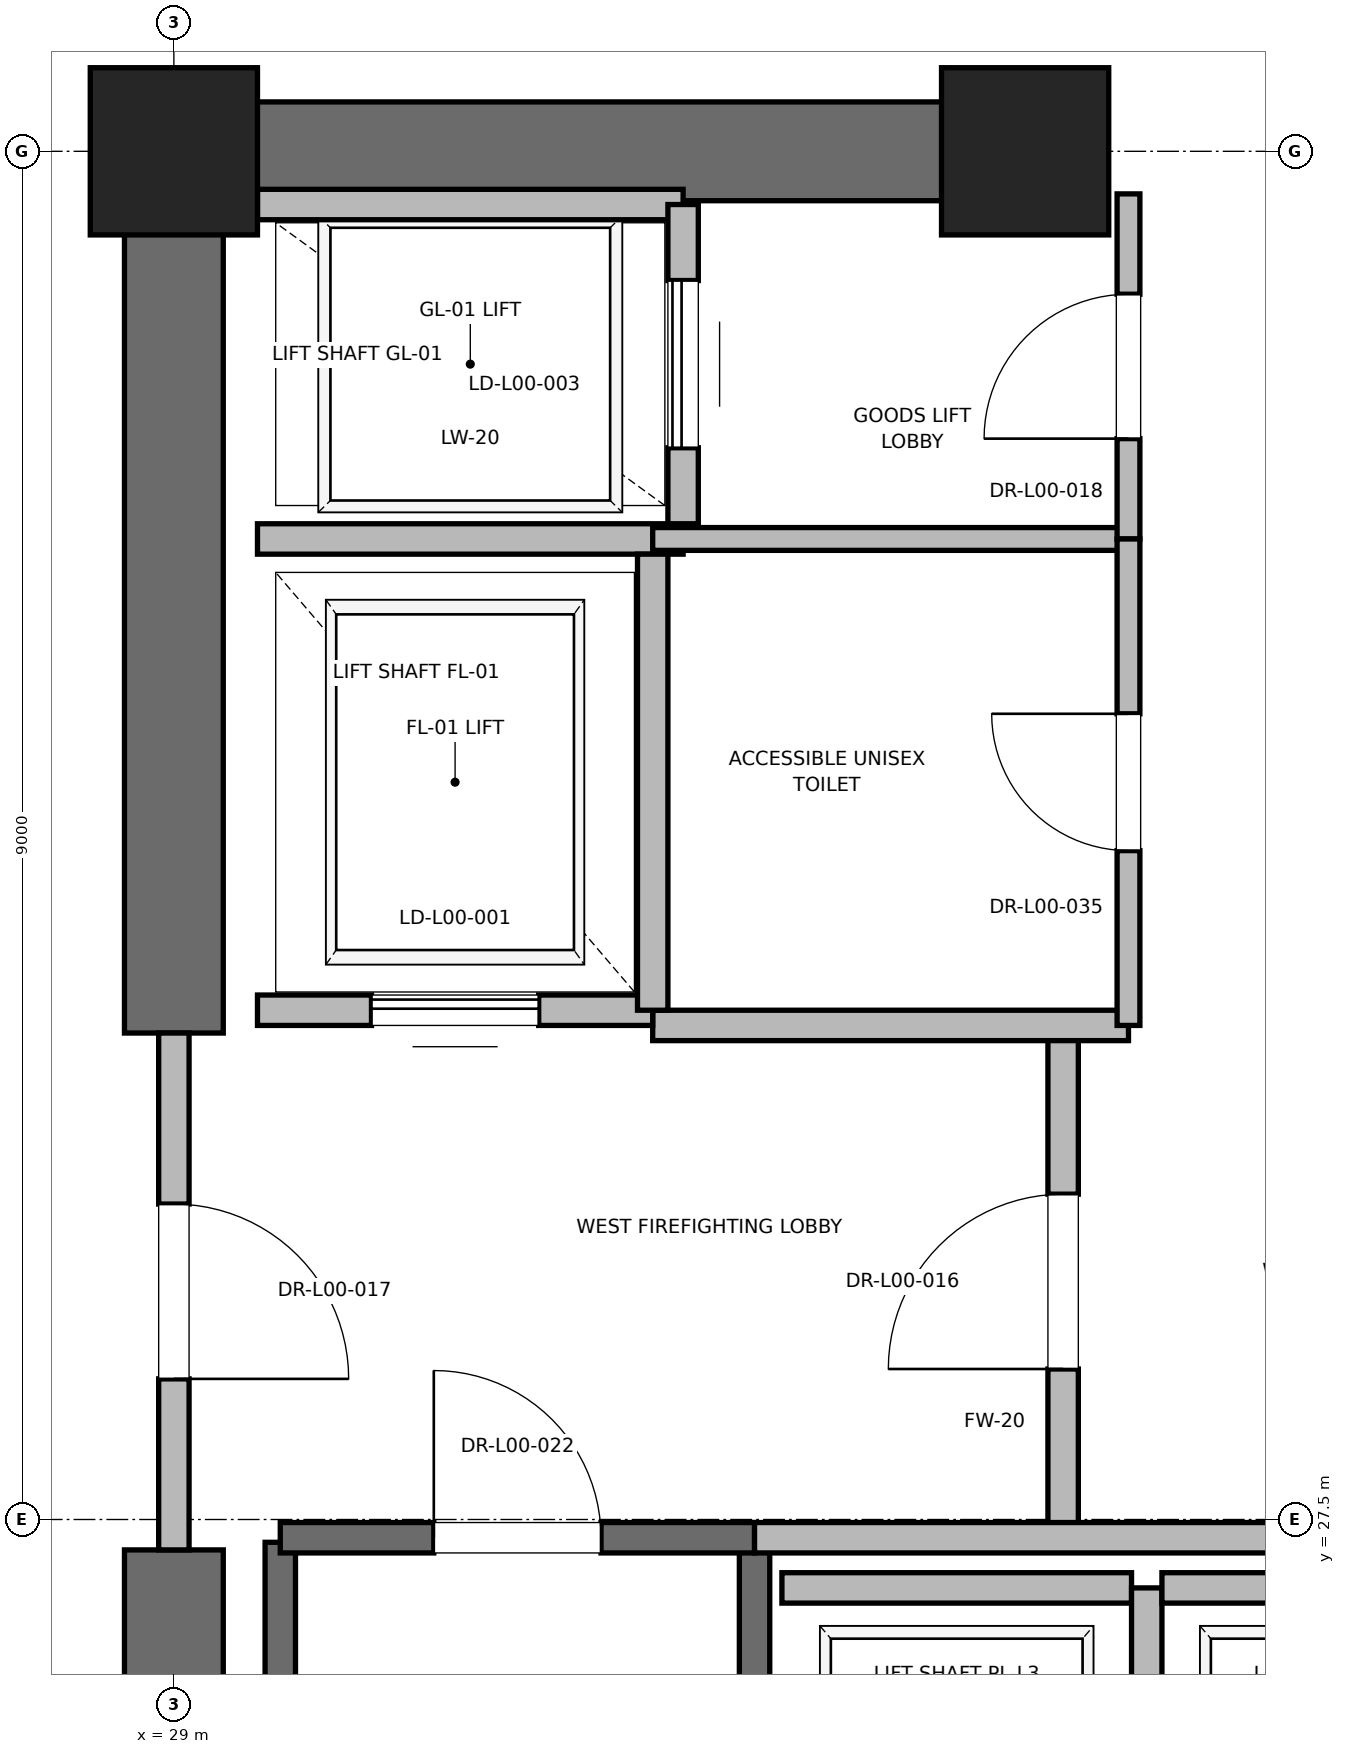
"""IFC4 building model, lengths in metres.
Left out: names, types, materials, properties, quantities, classifications, styles, units other than length and angle.
Written with IfcOpenShell. Run it as: python <this file> out.ifc"""

import sys

from ifc_helpers import new_model, si_unit, direction, frame, frame_2d, origin, origin_2d, place, context, subcontext, project, spatial, rectangle, extrude, element, fill, save


model = new_model("IFC4")
c1 = context("Model", 3, precision=1e-05, world=origin(), true_north=direction((0.0, 1.0)))
c2 = subcontext(c1, "Body", "Model", "MODEL_VIEW")
j1 = project(units=[si_unit("LENGTHUNIT", "METRE"), si_unit("PLANEANGLEUNIT", "RADIAN")], contexts=[c1])
p1 = place(None, origin())
s1 = spatial("IfcSite", under=j1, at=p1, CompositionType="ELEMENT")
p2 = place(p1, origin())
s2 = spatial("IfcBuilding", under=s1, at=p2, CompositionType="ELEMENT")
p3 = place(p2, origin())
s3 = spatial("IfcBuildingStorey", under=s2, at=p3, CompositionType="ELEMENT", Elevation=0.0)
for number, where, z_axis, x_axis in (
    (1, (29.0, 36.5, 0.0), (0.0, 0.0, 1.0), (1.0, 0.0, 0.0)),
    (2, (34.6, 36.5, 0.0), (0.0, 0.0, 1.0), (1.0, 0.0, 0.0)),
):
    element("IfcColumn", number, at=place(p3, frame(where, z_axis=z_axis, x_axis=x_axis)), inside=s3, PredefinedType="PILASTER", context=c2, shape_type="SweptSolid", body=[
        extrude(rectangle(XDim=1.1, YDim=1.1, at=origin_2d()), origin(), (0.0, 0.0, 1.0), 6.0),
    ])
p4 = place(p3, frame((29.0, 36.5, 0.0), z_axis=(0.0, 0.0, 1.0), x_axis=(1.0, 0.0, 0.0)))
e3 = element("IfcWall", 3, at=p4, inside=s3, PredefinedType="SHEAR", context=c2, shape_type="SweptSolid", body=[
    extrude(rectangle(XDim=5.8, YDim=0.65, at=frame_2d((2.9, 0.0))), origin(), (0.0, 0.0, 1.0), 5.72),
])
p5 = place(p3, frame((29.0, 18.5, 0.0), z_axis=(0.0, 0.0, 1.0), x_axis=(0.0, 1.0, 0.0)))
e4 = element("IfcWall", 4, at=p5, inside=s3, PredefinedType="SHEAR", context=c2, shape_type="SweptSolid", body=[
    extrude(rectangle(XDim=8.8, YDim=0.65, at=frame_2d((4.4, 0.0))), origin(), (0.0, 0.0, 1.0), 5.72),
])
p6 = place(p3, frame((29.0, 30.7, 0.0), z_axis=(0.0, 0.0, 1.0), x_axis=(0.0, 1.0, 0.0)))
e5 = element("IfcWall", 5, at=p6, inside=s3, PredefinedType="SHEAR", context=c2, shape_type="SweptSolid", body=[
    extrude(rectangle(XDim=5.8, YDim=0.65, at=frame_2d((2.9, 0.0))), origin(), (0.0, 0.0, 1.0), 5.72),
])
p7 = place(p3, frame((29.7, 19.2, 0.0), z_axis=(0.0, 0.0, 1.0), x_axis=(0.0, 1.0, 0.0)))
e6 = element("IfcWall", 6, at=p7, inside=s3, PredefinedType="SOLIDWALL", context=c2, shape_type="SweptSolid", body=[
    extrude(rectangle(XDim=8.15, YDim=0.2, at=frame_2d((4.075, 0.0))), origin(), (0.0, 0.0, 1.0), 5.72),
])
p8 = place(p3, frame((32.82, 18.6, 0.0), z_axis=(0.0, 0.0, 1.0), x_axis=(0.0, 1.0, 0.0)))
e7 = element("IfcWall", 7, at=p8, inside=s3, PredefinedType="SOLIDWALL", context=c2, shape_type="SweptSolid", body=[
    extrude(rectangle(XDim=8.78, YDim=0.2, at=frame_2d((4.39, 0.0))), origin(), (0.0, 0.0, 1.0), 5.72),
])
p9 = place(p3, frame((29.7, 27.38, 0.0), z_axis=(0.0, 0.0, 1.0), x_axis=(1.0, 0.0, 0.0)))
e8 = element("IfcWall", 8, at=p9, inside=s3, PredefinedType="SOLIDWALL", context=c2, shape_type="SweptSolid", body=[
    extrude(rectangle(XDim=3.12, YDim=0.2, at=frame_2d((1.56, 0.0))), origin(), (0.0, 0.0, 1.0), 5.72),
])
p10 = place(p9, frame((1.01, 0.0, 0.0)))
e9 = element("IfcOpeningElement", 9, at=p10, cuts=e8, PredefinedType="OPENING", context=c2, shape_type="SweptSolid", body=[
    extrude(rectangle(XDim=1.1, YDim=2.15, at=frame_2d((0.55, 1.075))), frame((0.0, 0.1, 0.0), z_axis=(0.0, -1.0, 0.0), x_axis=(1.0, 0.0, 0.0)), (0.0, 0.0, 1.0), 0.2),
])
p11 = place(p3, frame((34.85, 27.38, 0.0), z_axis=(0.0, 0.0, 1.0), x_axis=(0.0, 1.0, 0.0)))
e10 = element("IfcWall", 10, at=p11, inside=s3, PredefinedType="PARTITIONING", context=c2, shape_type="SweptSolid", body=[
    extrude(rectangle(XDim=3.37, YDim=0.2, at=frame_2d((1.685, 0.0))), origin(), (0.0, 0.0, 1.0), 5.72),
])
p12 = place(p11, frame((1.11, 0.0, 0.0)))
e11 = element("IfcOpeningElement", 11, at=p12, cuts=e10, PredefinedType="OPENING", context=c2, shape_type="SweptSolid", body=[
    extrude(rectangle(XDim=1.15, YDim=2.2, at=frame_2d((0.575, 1.1))), frame((0.0, 0.1, 0.0), z_axis=(0.0, -1.0, 0.0), x_axis=(1.0, 0.0, 0.0)), (0.0, 0.0, 1.0), 0.2),
])
p13 = place(p3, frame((29.0, 30.7, 0.0), z_axis=(0.0, 0.0, 1.0), x_axis=(0.0, -1.0, 0.0)))
e12 = element("IfcWall", 12, at=p13, inside=s3, PredefinedType="PARTITIONING", context=c2, shape_type="SweptSolid", body=[
    extrude(rectangle(XDim=3.4, YDim=0.2, at=frame_2d((1.7, 0.0))), origin(), (0.0, 0.0, 1.0), 4.5),
])
p14 = place(p13, frame((1.125, 0.0, 0.0)))
e13 = element("IfcOpeningElement", 13, at=p14, cuts=e12, PredefinedType="OPENING", context=c2, shape_type="SweptSolid", body=[
    extrude(rectangle(XDim=1.15, YDim=2.2, at=frame_2d((0.575, 1.1))), frame((0.0, 0.1, 0.0), z_axis=(0.0, -1.0, 0.0), x_axis=(1.0, 0.0, 0.0)), (0.0, 0.0, 1.0), 0.2),
])
p15 = place(p3, frame((32.82, 27.38, 0.0), z_axis=(0.0, 0.0, 1.0), x_axis=(1.0, 0.0, 0.0)))
e14 = element("IfcWall", 14, at=p15, inside=s3, PredefinedType="PARTITIONING", context=c2, shape_type="SweptSolid", body=[
    extrude(rectangle(XDim=5.62, YDim=0.2, at=frame_2d((2.81, 0.0))), origin(), (0.0, 0.0, 1.0), 5.72),
])
p16 = place(p3, frame((32.15, 30.75, 0.0), z_axis=(0.0, 0.0, 1.0), x_axis=(1.0, 0.0, 0.0)))
e15 = element("IfcWall", 15, at=p16, inside=s3, PredefinedType="PARTITIONING", context=c2, shape_type="SweptSolid", body=[
    extrude(rectangle(XDim=3.13, YDim=0.2, at=frame_2d((1.565, 0.0))), origin(), (0.0, 0.0, 1.0), 5.72),
])
p17 = place(p3, frame((29.55, 30.85, 0.0), z_axis=(0.0, 0.0, 1.0), x_axis=(1.0, 0.0, 0.0)))
e16 = element("IfcWall", 16, at=p17, inside=s3, PredefinedType="SOLIDWALL", context=c2, shape_type="SweptSolid", body=[
    extrude(rectangle(XDim=2.6, YDim=0.2, at=frame_2d((1.3, 0.0))), origin(), (0.0, 0.0, 1.0), 4.5),
])
p18 = place(p17, frame((0.75, 0.0, 0.0)))
e17 = element("IfcOpeningElement", 17, at=p18, cuts=e16, PredefinedType="OPENING", context=c2, shape_type="SweptSolid", body=[
    extrude(rectangle(XDim=1.1, YDim=2.2, at=frame_2d((0.55, 1.1))), frame((0.0, 0.1, 0.0), z_axis=(0.0, -1.0, 0.0), x_axis=(1.0, 0.0, 0.0)), (0.0, 0.0, 1.0), 0.2),
])
p19 = place(p3, frame((29.55, 33.95, 0.0), z_axis=(0.0, 0.0, 1.0), x_axis=(1.0, 0.0, 0.0)))
e18 = element("IfcWall", 18, at=p19, inside=s3, PredefinedType="SOLIDWALL", context=c2, shape_type="SweptSolid", body=[
    extrude(rectangle(XDim=2.8, YDim=0.2, at=frame_2d((1.4, 0.0))), origin(), (0.0, 0.0, 1.0), 5.72),
])
p20 = place(p3, frame((32.15, 30.85, 0.0), z_axis=(0.0, 0.0, 1.0), x_axis=(0.0, 1.0, 0.0)))
e19 = element("IfcWall", 19, at=p20, inside=s3, PredefinedType="SOLIDWALL", context=c2, shape_type="SweptSolid", body=[
    extrude(rectangle(XDim=3.0, YDim=0.2, at=frame_2d((1.5, 0.0))), origin(), (0.0, 0.0, 1.0), 5.72),
])
p21 = place(p3, frame((32.35, 36.15, 0.0), z_axis=(0.0, 0.0, 1.0), x_axis=(-1.0, 0.0, 0.0)))
e20 = element("IfcWall", 20, at=p21, inside=s3, PredefinedType="SOLIDWALL", context=c2, shape_type="SweptSolid", body=[
    extrude(rectangle(XDim=2.8, YDim=0.2, at=frame_2d((1.4, 0.0))), origin(), (0.0, 0.0, 1.0), 4.779),
])
p22 = place(p3, frame((32.35, 34.05, 0.0), z_axis=(0.0, 0.0, 1.0), x_axis=(0.0, 1.0, 0.0)))
e21 = element("IfcWall", 21, at=p22, inside=s3, PredefinedType="SOLIDWALL", context=c2, shape_type="SweptSolid", body=[
    extrude(rectangle(XDim=2.1, YDim=0.2, at=frame_2d((1.05, 0.0))), origin(), (0.0, 0.0, 1.0), 5.72),
])
p23 = place(p22, frame((0.5, 0.0, 0.0)))
e22 = element("IfcOpeningElement", 22, at=p23, cuts=e21, PredefinedType="OPENING", context=c2, shape_type="SweptSolid", body=[
    extrude(rectangle(XDim=1.1, YDim=2.2, at=frame_2d((0.55, 1.1))), frame((0.0, 0.1, 0.0), z_axis=(0.0, -1.0, 0.0), x_axis=(1.0, 0.0, 0.0)), (0.0, 0.0, 1.0), 0.2),
])
p24 = place(p3, frame((35.3, 27.05, 0.0), z_axis=(0.0, 0.0, 1.0), x_axis=(-1.0, 0.0, 0.0)))
e23 = element("IfcWall", 23, at=p24, inside=s3, PredefinedType="SOLIDWALL", context=c2, shape_type="SweptSolid", body=[
    extrude(rectangle(XDim=2.3, YDim=0.2, at=frame_2d((1.15, 0.0))), origin(), (0.0, 0.0, 1.0), 5.72),
])
p25 = place(p3, frame((35.4, 24.45, 0.0), z_axis=(0.0, 0.0, 1.0), x_axis=(0.0, 1.0, 0.0)))
e24 = element("IfcWall", 24, at=p25, inside=s3, PredefinedType="SOLIDWALL", context=c2, shape_type="SweptSolid", body=[
    extrude(rectangle(XDim=2.6, YDim=0.2, at=frame_2d((1.3, 0.0))), origin(), (0.0, 0.0, 1.0), 5.72),
])
p26 = place(p3, frame((37.8, 27.05, 0.0), z_axis=(0.0, 0.0, 1.0), x_axis=(-1.0, 0.0, 0.0)))
e25 = element("IfcWall", 25, at=p26, inside=s3, PredefinedType="SOLIDWALL", context=c2, shape_type="SweptSolid", body=[
    extrude(rectangle(XDim=2.3, YDim=0.2, at=frame_2d((1.15, 0.0))), origin(), (0.0, 0.0, 1.0), 5.72),
])
p27 = place(p3, frame((32.15, 33.95, 0.0), z_axis=(0.0, 0.0, 1.0), x_axis=(1.0, 0.0, 0.0)))
e26 = element("IfcWall", 26, at=p27, inside=s3, PredefinedType="PARTITIONING", context=c2, shape_type="SweptSolid", body=[
    extrude(rectangle(XDim=3.13, YDim=0.15, at=frame_2d((1.565, 0.0))), origin(), (0.0, 0.0, 1.0), 2.85),
])
p28 = place(p3, frame((35.28, 33.95, 0.0), z_axis=(0.0, 0.0, 1.0), x_axis=(0.0, 1.0, 0.0)))
e27 = element("IfcWall", 27, at=p28, inside=s3, PredefinedType="PARTITIONING", context=c2, shape_type="SweptSolid", body=[
    extrude(rectangle(XDim=2.27, YDim=0.15, at=frame_2d((1.135, 0.0))), origin(), (0.0, 0.0, 1.0), 2.85),
])
p29 = place(p28, frame((0.66, 0.0, 0.0)))
e28 = element("IfcOpeningElement", 28, at=p29, cuts=e27, PredefinedType="OPENING", context=c2, shape_type="SweptSolid", body=[
    extrude(rectangle(XDim=0.95, YDim=2.15, at=frame_2d((0.475, 1.075))), frame((0.0, 0.075, 0.0), z_axis=(0.0, -1.0, 0.0), x_axis=(1.0, 0.0, 0.0)), (0.0, 0.0, 1.0), 0.15),
])
p30 = place(p3, frame((35.28, 30.75, 0.0), z_axis=(0.0, 0.0, 1.0), x_axis=(0.0, 1.0, 0.0)))
e29 = element("IfcWall", 29, at=p30, inside=s3, PredefinedType="PARTITIONING", context=c2, shape_type="SweptSolid", body=[
    extrude(rectangle(XDim=3.2, YDim=0.15, at=frame_2d((1.6, 0.0))), origin(), (0.0, 0.0, 1.0), 2.85),
])
p31 = place(p30, frame((1.15, 0.0, 0.0)))
e30 = element("IfcOpeningElement", 30, at=p31, cuts=e29, PredefinedType="OPENING", context=c2, shape_type="SweptSolid", body=[
    extrude(rectangle(XDim=0.9, YDim=2.1, at=frame_2d((0.45, 1.05))), frame((0.0, 0.075, 0.0), z_axis=(0.0, -1.0, 0.0), x_axis=(1.0, 0.0, 0.0)), (0.0, 0.0, 1.0), 0.15),
])
p32 = place(p10, origin())
e31 = element("IfcDoor", 31, at=p32, inside=s3, OperationType="SINGLE_SWING_LEFT", PredefinedType="DOOR", context=c2, shape_type="SweptSolid", body=[
    extrude(rectangle(XDim=1.1, YDim=2.15, at=frame_2d((0.55, 1.075))), frame((0.0, 0.025, 0.0), z_axis=(0.0, -1.0, 0.0), x_axis=(1.0, 0.0, 0.0)), (0.0, 0.0, 1.0), 0.05),
])
fill(e9, e31)
p33 = place(p12, origin())
e32 = element("IfcDoor", 32, at=p33, inside=s3, OperationType="SINGLE_SWING_LEFT", PredefinedType="DOOR", context=c2, shape_type="SweptSolid", body=[
    extrude(rectangle(XDim=1.15, YDim=2.2, at=frame_2d((0.575, 1.1))), frame((0.0, 0.025, 0.0), z_axis=(0.0, -1.0, 0.0), x_axis=(1.0, 0.0, 0.0)), (0.0, 0.0, 1.0), 0.05),
])
fill(e11, e32)
p34 = place(p14, origin())
e33 = element("IfcDoor", 33, at=p34, inside=s3, OperationType="SINGLE_SWING_RIGHT", PredefinedType="DOOR", context=c2, shape_type="SweptSolid", body=[
    extrude(rectangle(XDim=1.15, YDim=2.2, at=frame_2d((0.575, 1.1))), frame((0.0, 0.025, 0.0), z_axis=(0.0, -1.0, 0.0), x_axis=(1.0, 0.0, 0.0)), (0.0, 0.0, 1.0), 0.05),
])
fill(e13, e33)
p35 = place(p18, origin())
e34 = element("IfcDoor", 34, at=p35, inside=s3, OperationType="SLIDING_TO_RIGHT", PredefinedType="DOOR", context=c2, shape_type="SweptSolid", body=[
    extrude(rectangle(XDim=1.1, YDim=2.2, at=frame_2d((0.55, 1.1))), frame((0.0, 0.025, 0.0), z_axis=(0.0, -1.0, 0.0), x_axis=(1.0, 0.0, 0.0)), (0.0, 0.0, 1.0), 0.05),
])
fill(e17, e34)
p36 = place(p23, origin())
e35 = element("IfcDoor", 35, at=p36, inside=s3, OperationType="SLIDING_TO_RIGHT", PredefinedType="DOOR", context=c2, shape_type="SweptSolid", body=[
    extrude(rectangle(XDim=1.1, YDim=2.2, at=frame_2d((0.55, 1.1))), frame((0.0, 0.025, 0.0), z_axis=(0.0, -1.0, 0.0), x_axis=(1.0, 0.0, 0.0)), (0.0, 0.0, 1.0), 0.05),
])
fill(e22, e35)
p37 = place(p29, origin())
e36 = element("IfcDoor", 36, at=p37, inside=s3, OperationType="SINGLE_SWING_LEFT", PredefinedType="DOOR", context=c2, shape_type="SweptSolid", body=[
    extrude(rectangle(XDim=0.95, YDim=2.15, at=frame_2d((0.475, 1.075))), frame((0.0, 0.025, 0.0), z_axis=(0.0, -1.0, 0.0), x_axis=(1.0, 0.0, 0.0)), (0.0, 0.0, 1.0), 0.05),
])
fill(e28, e36)
p38 = place(p31, origin())
e37 = element("IfcDoor", 37, at=p38, inside=s3, OperationType="SINGLE_SWING_RIGHT", PredefinedType="DOOR", context=c2, shape_type="SweptSolid", body=[
    extrude(rectangle(XDim=0.9, YDim=2.1, at=frame_2d((0.45, 1.05))), frame((0.0, 0.025, 0.0), z_axis=(0.0, -1.0, 0.0), x_axis=(1.0, 0.0, 0.0)), (0.0, 0.0, 1.0), 0.05),
])
fill(e30, e37)
save(model, sys.argv[1])
